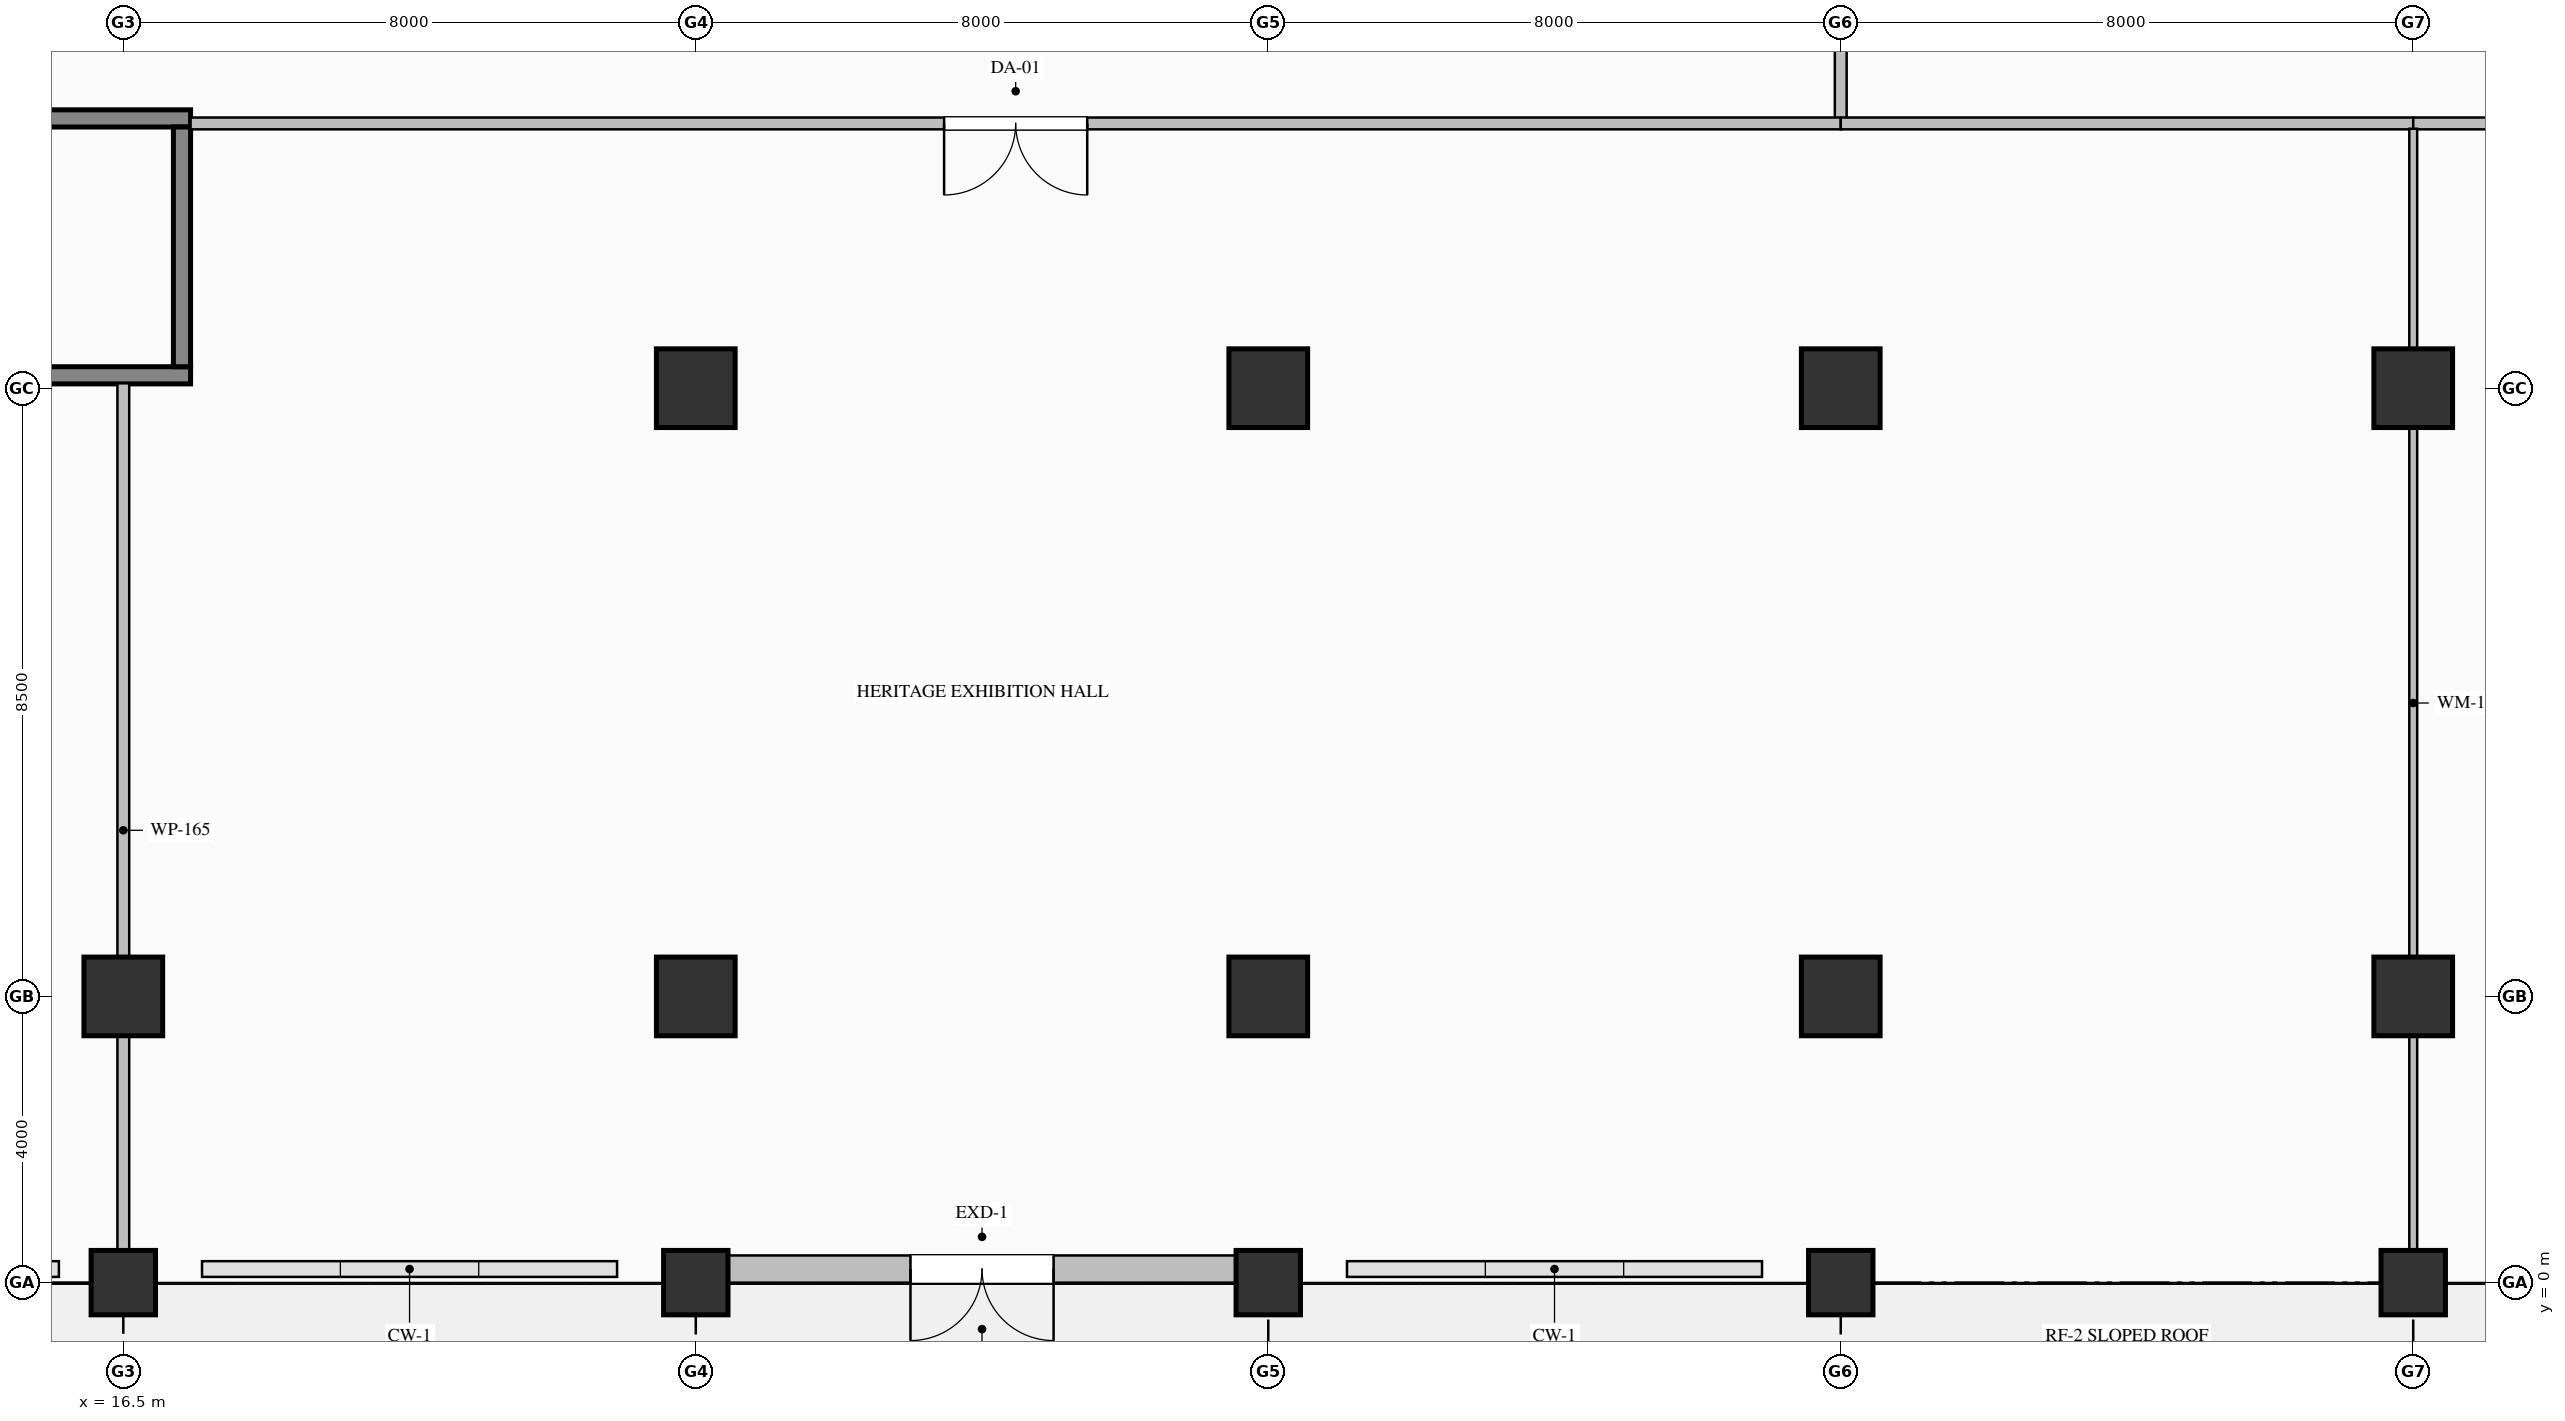
"""IFC4 building model, lengths in metres.
Left out: names, types, materials, properties, quantities, classifications, styles, units other than length and angle.
Written with IfcOpenShell. Run it as: python <this file> out.ifc"""

import sys

from ifc_helpers import new_model, si_unit, direction, frame, frame_2d, origin, origin_2d, place, context, subcontext, project, spatial, rectangle, extrude, element, fill, save


model = new_model("IFC4")
c1 = context("Model", 3, precision=1e-05, world=origin(), true_north=direction((0.0, 1.0)))
c2 = subcontext(c1, "Body", "Model", "MODEL_VIEW")
j1 = project(units=[si_unit("LENGTHUNIT", "METRE"), si_unit("PLANEANGLEUNIT", "RADIAN")], contexts=[c1])
p1 = place(None, origin())
s1 = spatial("IfcSite", under=j1, at=p1, CompositionType="ELEMENT")
p2 = place(p1, origin())
s2 = spatial("IfcBuilding", under=s1, at=p2, CompositionType="ELEMENT")
p3 = place(p2, origin())
s3 = spatial("IfcBuildingStorey", under=s2, at=p3, CompositionType="ELEMENT", Elevation=0.0)
p4 = place(p3, frame((16.5, 0.0, 0.0), z_axis=(0.0, 0.0, 1.0), x_axis=(1.0, 0.0, 0.0)))
e1 = element("IfcColumn", 1, at=p4, inside=s3, PredefinedType="PILASTER", context=c2, shape_type="SweptSolid", body=[
    extrude(rectangle(XDim=0.9, YDim=0.9, at=origin_2d()), origin(), (0.0, 0.0, 1.0), 6.0),
])
p5 = place(p3, frame((16.5, 4.0, 0.0), z_axis=(0.0, 0.0, 1.0), x_axis=(1.0, 0.0, 0.0)))
e2 = element("IfcColumn", 2, at=p5, inside=s3, PredefinedType="COLUMN", context=c2, shape_type="SweptSolid", body=[
    extrude(rectangle(XDim=1.1, YDim=1.1, at=origin_2d()), origin(), (0.0, 0.0, 1.0), 6.0),
])
p6 = place(p3, frame((24.5, 0.0, 0.0), z_axis=(0.0, 0.0, 1.0), x_axis=(1.0, 0.0, 0.0)))
e3 = element("IfcColumn", 3, at=p6, inside=s3, PredefinedType="PILASTER", context=c2, shape_type="SweptSolid", body=[
    extrude(rectangle(XDim=0.9, YDim=0.9, at=origin_2d()), origin(), (0.0, 0.0, 1.0), 6.0),
])
for number, where, z_axis, x_axis in (
    (4, (24.5, 4.0, 0.0), (0.0, 0.0, 1.0), (1.0, 0.0, 0.0)),
    (5, (24.5, 12.5, 0.0), (0.0, 0.0, 1.0), (1.0, 0.0, 0.0)),
):
    element("IfcColumn", number, at=place(p3, frame(where, z_axis=z_axis, x_axis=x_axis)), inside=s3, PredefinedType="COLUMN", context=c2, shape_type="SweptSolid", body=[
        extrude(rectangle(XDim=1.1, YDim=1.1, at=origin_2d()), origin(), (0.0, 0.0, 1.0), 6.0),
    ])
p7 = place(p3, frame((32.5, 0.0, 0.0), z_axis=(0.0, 0.0, 1.0), x_axis=(1.0, 0.0, 0.0)))
e6 = element("IfcColumn", 6, at=p7, inside=s3, PredefinedType="PILASTER", context=c2, shape_type="SweptSolid", body=[
    extrude(rectangle(XDim=0.9, YDim=0.9, at=origin_2d()), origin(), (0.0, 0.0, 1.0), 6.0),
])
for number, where, z_axis, x_axis in (
    (7, (32.5, 4.0, 0.0), (0.0, 0.0, 1.0), (1.0, 0.0, 0.0)),
    (8, (32.5, 12.5, 0.0), (0.0, 0.0, 1.0), (1.0, 0.0, 0.0)),
):
    element("IfcColumn", number, at=place(p3, frame(where, z_axis=z_axis, x_axis=x_axis)), inside=s3, PredefinedType="COLUMN", context=c2, shape_type="SweptSolid", body=[
        extrude(rectangle(XDim=1.1, YDim=1.1, at=origin_2d()), origin(), (0.0, 0.0, 1.0), 6.0),
    ])
p8 = place(p3, frame((40.5, 0.0, 0.0), z_axis=(0.0, 0.0, 1.0), x_axis=(1.0, 0.0, 0.0)))
e9 = element("IfcColumn", 9, at=p8, inside=s3, PredefinedType="PILASTER", context=c2, shape_type="SweptSolid", body=[
    extrude(rectangle(XDim=0.9, YDim=0.9, at=origin_2d()), origin(), (0.0, 0.0, 1.0), 6.0),
])
for number, where, z_axis, x_axis in (
    (10, (40.5, 4.0, 0.0), (0.0, 0.0, 1.0), (1.0, 0.0, 0.0)),
    (11, (40.5, 12.5, 0.0), (0.0, 0.0, 1.0), (1.0, 0.0, 0.0)),
):
    element("IfcColumn", number, at=place(p3, frame(where, z_axis=z_axis, x_axis=x_axis)), inside=s3, PredefinedType="COLUMN", context=c2, shape_type="SweptSolid", body=[
        extrude(rectangle(XDim=1.1, YDim=1.1, at=origin_2d()), origin(), (0.0, 0.0, 1.0), 6.0),
    ])
p9 = place(p3, frame((48.5, 0.0, 0.0), z_axis=(0.0, 0.0, 1.0), x_axis=(1.0, 0.0, 0.0)))
e12 = element("IfcColumn", 12, at=p9, inside=s3, PredefinedType="PILASTER", context=c2, shape_type="SweptSolid", body=[
    extrude(rectangle(XDim=0.9, YDim=0.9, at=origin_2d()), origin(), (0.0, 0.0, 1.0), 6.0),
])
for number, where, z_axis, x_axis in (
    (13, (48.5, 4.0, 0.0), (0.0, 0.0, 1.0), (1.0, 0.0, 0.0)),
    (14, (48.5, 12.5, 0.0), (0.0, 0.0, 1.0), (1.0, 0.0, 0.0)),
):
    element("IfcColumn", number, at=place(p3, frame(where, z_axis=z_axis, x_axis=x_axis)), inside=s3, PredefinedType="COLUMN", context=c2, shape_type="SweptSolid", body=[
        extrude(rectangle(XDim=1.1, YDim=1.1, at=origin_2d()), origin(), (0.0, 0.0, 1.0), 6.0),
    ])
p10 = place(p3, frame((32.07, 0.19, 0.0), z_axis=(0.0, 0.0, 1.0), x_axis=(-1.0, 0.0, 0.0)))
e15 = element("IfcWall", 15, at=p10, inside=s3, PredefinedType="SOLIDWALL", context=c2, shape_type="SweptSolid", body=[
    extrude(rectangle(XDim=7.14, YDim=0.38, at=frame_2d((3.57, 0.0))), origin(), (0.0, 0.0, 1.0), 5.22),
])
p11 = place(p10, frame((2.57, 0.0, 0.0)))
e16 = element("IfcOpeningElement", 16, at=p11, cuts=e15, PredefinedType="OPENING", context=c2, shape_type="SweptSolid", body=[
    extrude(rectangle(XDim=2.0, YDim=2.4, at=frame_2d((1.0, 1.2))), frame((0.0, 0.2, 0.0), z_axis=(0.0, -1.0, 0.0), x_axis=(1.0, 0.0, 0.0)), (0.0, 0.0, 1.0), 0.4),
])
for number, where, z_axis, x_axis in (
    (17, (9.16, 16.27, 0.0), (0.0, 0.0, 1.0), (1.0, 0.0, 0.0)),
    (18, (17.44, 12.68, 0.0), (0.0, 0.0, 1.0), (-1.0, 0.0, 0.0)),
):
    element("IfcWall", number, at=place(p3, frame(where, z_axis=z_axis, x_axis=x_axis)), inside=s3, PredefinedType="SOLIDWALL", context=c2, shape_type="SweptSolid", body=[
        extrude(rectangle(XDim=8.28, YDim=0.24, at=frame_2d((4.14, 0.0))), origin(), (0.0, 0.0, 1.0), 6.0),
    ])
p12 = place(p3, frame((17.32, 12.8, 0.0), z_axis=(0.0, 0.0, 1.0), x_axis=(0.0, 1.0, 0.0)))
e19 = element("IfcWall", 19, at=p12, inside=s3, PredefinedType="SOLIDWALL", context=c2, shape_type="SweptSolid", body=[
    extrude(rectangle(XDim=3.35, YDim=0.24, at=frame_2d((1.675, 0.0))), origin(), (0.0, 0.0, 1.0), 6.0),
])
p13 = place(p3, frame((40.5, 31.525, 0.0), z_axis=(0.0, 0.0, 1.0), x_axis=(0.0, -1.0, 0.0)))
e20 = element("IfcWall", 20, at=p13, inside=s3, PredefinedType="PARTITIONING", context=c2, shape_type="SweptSolid", body=[
    extrude(rectangle(XDim=15.251, YDim=0.165, at=frame_2d((7.625, 0.0))), origin(), (0.0, 0.0, 1.0), 4.812),
])
p14 = place(p13, frame((6.825, 0.0, 0.0)))
e21 = element("IfcOpeningElement", 21, at=p14, cuts=e20, PredefinedType="OPENING", context=c2, shape_type="SweptSolid", body=[
    extrude(rectangle(XDim=1.6, YDim=2.25, at=frame_2d((0.8, 1.125))), frame((0.0, 0.093, 0.0), z_axis=(0.0, -1.0, 0.0), x_axis=(1.0, 0.0, 0.0)), (0.0, 0.0, 1.0), 0.185),
])
p15 = place(p3, frame((40.5, 16.2, 0.0), z_axis=(0.0, 0.0, 1.0), x_axis=(-1.0, 0.0, 0.0)))
e22 = element("IfcWall", 22, at=p15, inside=s3, PredefinedType="PARTITIONING", context=c2, shape_type="SweptSolid", body=[
    extrude(rectangle(XDim=23.06, YDim=0.165, at=frame_2d((11.53, 0.0))), origin(), (0.0, 0.0, 1.0), 5.72),
])
p16 = place(p15, frame((10.53, 0.0, 0.0)))
e23 = element("IfcOpeningElement", 23, at=p16, cuts=e22, PredefinedType="OPENING", context=c2, shape_type="SweptSolid", body=[
    extrude(rectangle(XDim=2.0, YDim=2.4, at=frame_2d((1.0, 1.2))), frame((0.0, 0.093, 0.0), z_axis=(0.0, -1.0, 0.0), x_axis=(1.0, 0.0, 0.0)), (0.0, 0.0, 1.0), 0.185),
])
p17 = place(p3, frame((48.5, 16.2, 0.0), z_axis=(0.0, 0.0, 1.0), x_axis=(-1.0, 0.0, 0.0)))
e24 = element("IfcWall", 24, at=p17, inside=s3, PredefinedType="PARTITIONING", context=c2, shape_type="SweptSolid", body=[
    extrude(rectangle(XDim=8.0, YDim=0.165, at=frame_2d((4.0, 0.0))), origin(), (0.0, 0.0, 1.0), 5.72),
])
p18 = place(p3, frame((56.5, 16.2, 0.0), z_axis=(0.0, 0.0, 1.0), x_axis=(-1.0, 0.0, 0.0)))
e25 = element("IfcWall", 25, at=p18, inside=s3, PredefinedType="PARTITIONING", context=c2, shape_type="SweptSolid", body=[
    extrude(rectangle(XDim=8.0, YDim=0.165, at=frame_2d((4.0, 0.0))), origin(), (0.0, 0.0, 1.0), 5.72),
])
p19 = place(p18, frame((3.5, 0.0, 0.0)))
e26 = element("IfcOpeningElement", 26, at=p19, cuts=e25, PredefinedType="OPENING", context=c2, shape_type="SweptSolid", body=[
    extrude(rectangle(XDim=1.0, YDim=2.15, at=frame_2d((0.5, 1.075))), frame((0.0, 0.093, 0.0), z_axis=(0.0, -1.0, 0.0), x_axis=(1.0, 0.0, 0.0)), (0.0, 0.0, 1.0), 0.185),
])
p20 = place(p3, frame((48.5, 16.125, 0.0), z_axis=(0.0, 0.0, 1.0), x_axis=(0.0, -1.0, 0.0)))
e27 = element("IfcWall", 27, at=p20, inside=s3, PredefinedType="MOVABLE", context=c2, shape_type="SweptSolid", body=[
    extrude(rectangle(XDim=16.051, YDim=0.11, at=frame_2d((8.025, 0.0))), origin(), (0.0, 0.0, 1.0), 4.812),
])
p21 = place(p3, frame((16.5, 0.075, 0.0), z_axis=(0.0, 0.0, 1.0), x_axis=(0.0, 1.0, 0.0)))
e28 = element("IfcWall", 28, at=p21, inside=s3, PredefinedType="PARTITIONING", context=c2, shape_type="SweptSolid", body=[
    extrude(rectangle(XDim=12.493, YDim=0.165, at=frame_2d((6.247, 0.0))), origin(), (0.0, 0.0, 1.0), 4.812),
])
p22 = place(p11, origin())
e29 = element("IfcDoor", 29, at=p22, inside=s3, OperationType="DOUBLE_DOOR_SINGLE_SWING", PredefinedType="DOOR", context=c2, shape_type="SweptSolid", body=[
    extrude(rectangle(XDim=2.0, YDim=2.4, at=frame_2d((1.0, 1.2))), frame((0.0, 0.025, 0.0), z_axis=(0.0, -1.0, 0.0), x_axis=(1.0, 0.0, 0.0)), (0.0, 0.0, 1.0), 0.05),
])
fill(e16, e29)
p23 = place(p16, origin())
e30 = element("IfcDoor", 30, at=p23, inside=s3, OperationType="DOUBLE_DOOR_SINGLE_SWING", PredefinedType="DOOR", context=c2, shape_type="SweptSolid", body=[
    extrude(rectangle(XDim=2.0, YDim=2.4, at=frame_2d((1.0, 1.2))), frame((0.0, 0.025, 0.0), z_axis=(0.0, -1.0, 0.0), x_axis=(1.0, 0.0, 0.0)), (0.0, 0.0, 1.0), 0.05),
])
fill(e23, e30)
save(model, sys.argv[1])
